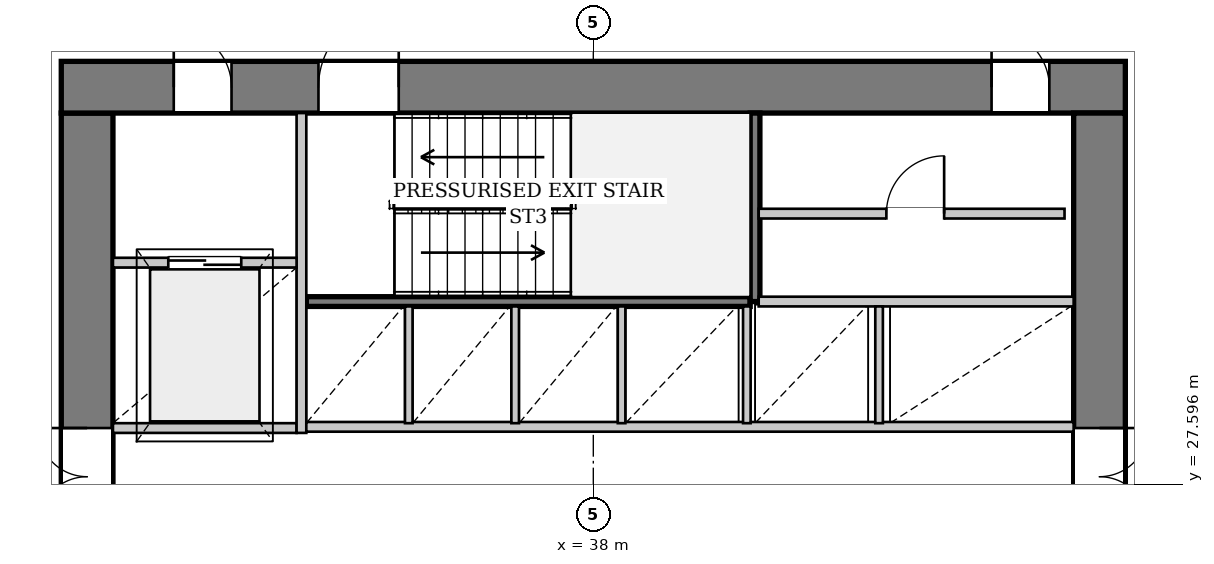
"""IFC4 building model, lengths in metres.
Left out: names, types, materials, properties, quantities, classifications, styles, units other than length and angle.
Written with IfcOpenShell. Run it as: python <this file> out.ifc"""

import sys

from ifc_helpers import new_model, si_unit, direction, frame, frame_2d, origin, place, context, subcontext, project, spatial, rectangle, extrude, source, transform, mapped, element, fill, save


model = new_model("IFC4")
c1 = context("Model", 3, precision=1e-05, world=origin(), true_north=direction((0.0, 1.0)))
c2 = subcontext(c1, "Body", "Model", "MODEL_VIEW")
j1 = project(units=[si_unit("LENGTHUNIT", "METRE"), si_unit("PLANEANGLEUNIT", "RADIAN")], contexts=[c1])
p1 = place(None, origin())
s1 = spatial("IfcSite", under=j1, at=p1, CompositionType="ELEMENT")
p2 = place(p1, origin())
s2 = spatial("IfcBuilding", under=s1, at=p2, CompositionType="ELEMENT")
p3 = place(p2, frame((0.0, 0.0, 57.7)))
s3 = spatial("IfcBuildingStorey", under=s2, at=p3, CompositionType="ELEMENT", Elevation=57.7)
p4 = place(p3, frame((29.675, 19.5, 0.0), z_axis=(0.0, 0.0, 1.0), x_axis=(0.0, 1.0, 0.0)))
e1 = element("IfcWall", 1, at=p4, inside=s3, PredefinedType="SHEAR", context=c2, shape_type="SweptSolid", body=[
    extrude(rectangle(XDim=14.2, YDim=0.85, at=frame_2d((7.1, 0.0))), origin(), (0.0, 0.0, 1.0), 3.3),
])
p5 = place(p4, frame((7.42, 0.0, 0.0)))
e2 = element("IfcOpeningElement", 2, at=p5, cuts=e1, PredefinedType="OPENING", context=c2, shape_type="SweptSolid", body=[
    extrude(rectangle(XDim=1.6, YDim=2.2, at=frame_2d((0.8, 1.1))), frame((0.0, 0.435, 0.0), z_axis=(0.0, -1.0, 0.0), x_axis=(1.0, 0.0, 0.0)), (0.0, 0.0, 1.0), 0.87),
])
p6 = place(p3, frame((29.25, 34.125, 0.0), z_axis=(0.0, 0.0, 1.0), x_axis=(1.0, 0.0, 0.0)))
e3 = element("IfcWall", 3, at=p6, inside=s3, PredefinedType="SHEAR", context=c2, shape_type="SweptSolid", body=[
    extrude(rectangle(XDim=17.5, YDim=0.85, at=frame_2d((8.75, 0.0))), origin(), (0.0, 0.0, 1.0), 3.3),
])
p7 = place(p6, frame((1.85, 0.0, 0.0)))
e4 = element("IfcOpeningElement", 4, at=p7, cuts=e3, PredefinedType="OPENING", context=c2, shape_type="SweptSolid", body=[
    extrude(rectangle(XDim=0.95, YDim=2.1, at=frame_2d((0.475, 1.05))), frame((0.0, 0.435, 0.0), z_axis=(0.0, -1.0, 0.0), x_axis=(1.0, 0.0, 0.0)), (0.0, 0.0, 1.0), 0.87),
])
p8 = place(p6, frame((4.23, 0.0, 0.0)))
e5 = element("IfcOpeningElement", 5, at=p8, cuts=e3, PredefinedType="OPENING", context=c2, shape_type="SweptSolid", body=[
    extrude(rectangle(XDim=1.32, YDim=2.2, at=frame_2d((0.66, 1.1))), frame((0.0, 0.435, 0.0), z_axis=(0.0, -1.0, 0.0), x_axis=(1.0, 0.0, 0.0)), (0.0, 0.0, 1.0), 0.87),
])
p9 = place(p6, frame((15.3, 0.0, 0.0)))
e6 = element("IfcOpeningElement", 6, at=p9, cuts=e3, PredefinedType="OPENING", context=c2, shape_type="SweptSolid", body=[
    extrude(rectangle(XDim=0.95, YDim=2.1, at=frame_2d((0.475, 1.05))), frame((0.0, 0.435, 0.0), z_axis=(0.0, -1.0, 0.0), x_axis=(1.0, 0.0, 0.0)), (0.0, 0.0, 1.0), 0.87),
])
p10 = place(p3, frame((46.325, 33.7, 0.0), z_axis=(0.0, 0.0, 1.0), x_axis=(0.0, -1.0, 0.0)))
e7 = element("IfcWall", 7, at=p10, inside=s3, PredefinedType="SHEAR", context=c2, shape_type="SweptSolid", body=[
    extrude(rectangle(XDim=14.2, YDim=0.85, at=frame_2d((7.1, 0.0))), origin(), (0.0, 0.0, 1.0), 3.3),
])
p11 = place(p10, frame((5.18, 0.0, 0.0)))
e8 = element("IfcOpeningElement", 8, at=p11, cuts=e7, PredefinedType="OPENING", context=c2, shape_type="SweptSolid", body=[
    extrude(rectangle(XDim=1.6, YDim=2.2, at=frame_2d((0.8, 1.1))), frame((0.0, 0.435, 0.0), z_axis=(0.0, -1.0, 0.0), x_axis=(1.0, 0.0, 0.0)), (0.0, 0.0, 1.0), 0.87),
])
p12 = place(p3, frame((33.28, 30.6, 0.0), z_axis=(0.0, 0.0, 1.0), x_axis=(1.0, 0.0, 0.0)))
e9 = element("IfcWall", 9, at=p12, inside=s3, PredefinedType="PARTITIONING", context=c2, shape_type="SweptSolid", body=[
    extrude(rectangle(XDim=7.3, YDim=0.16, at=frame_2d((3.65, 0.0))), origin(), (0.0, 0.0, 1.0), 3.3),
])
p13 = place(p3, frame((40.66, 30.6, 0.0), z_axis=(0.0, 0.0, 1.0), x_axis=(0.0, 1.0, 0.0)))
e10 = element("IfcWall", 10, at=p13, inside=s3, PredefinedType="PARTITIONING", context=c2, shape_type="SweptSolid", body=[
    extrude(rectangle(XDim=3.1, YDim=0.16, at=frame_2d((1.55, 0.0))), origin(), (0.0, 0.0, 1.0), 3.3),
])
p14 = place(p3, frame((30.1, 28.52, 0.0), z_axis=(0.0, 0.0, 1.0), x_axis=(1.0, 0.0, 0.0)))
e11 = element("IfcWall", 11, at=p14, inside=s3, PredefinedType="PARTITIONING", context=c2, shape_type="SweptSolid", body=[
    extrude(rectangle(XDim=3.02, YDim=0.16, at=frame_2d((1.51, 0.0))), origin(), (0.0, 0.0, 1.0), 3.3),
])
p15 = place(p3, frame((33.2, 28.44, 0.0), z_axis=(0.0, 0.0, 1.0), x_axis=(0.0, 1.0, 0.0)))
e12 = element("IfcWall", 12, at=p15, inside=s3, PredefinedType="PARTITIONING", context=c2, shape_type="SweptSolid", body=[
    extrude(rectangle(XDim=5.26, YDim=0.16, at=frame_2d((2.63, 0.0))), origin(), (0.0, 0.0, 1.0), 3.3),
])
p16 = place(p3, frame((30.1, 31.24, 0.0), z_axis=(0.0, 0.0, 1.0), x_axis=(1.0, 0.0, 0.0)))
e13 = element("IfcWall", 13, at=p16, inside=s3, PredefinedType="PARTITIONING", context=c2, shape_type="SweptSolid", body=[
    extrude(rectangle(XDim=3.02, YDim=0.16, at=frame_2d((1.51, 0.0))), origin(), (0.0, 0.0, 1.0), 3.3),
])
p17 = place(p16, frame((0.91, 0.0, 0.0)))
e14 = element("IfcOpeningElement", 14, at=p17, cuts=e13, PredefinedType="OPENING", context=c2, shape_type="SweptSolid", body=[
    extrude(rectangle(XDim=1.2, YDim=2.2, at=frame_2d((0.6, 1.1))), frame((0.0, 0.09, 0.0), z_axis=(0.0, -1.0, 0.0), x_axis=(1.0, 0.0, 0.0)), (0.0, 0.0, 1.0), 0.18),
])
p18 = place(p3, frame((33.28, 28.54, 0.0), z_axis=(0.0, 0.0, 1.0), x_axis=(1.0, 0.0, 0.0)))
e15 = element("IfcWall", 15, at=p18, inside=s3, PredefinedType="PARTITIONING", context=c2, shape_type="SweptSolid", body=[
    extrude(rectangle(XDim=12.62, YDim=0.16, at=frame_2d((6.31, 0.0))), origin(), (0.0, 0.0, 1.0), 3.3),
])
p19 = place(p3, frame((40.72, 30.6, 0.0), z_axis=(0.0, 0.0, 1.0), x_axis=(1.0, 0.0, 0.0)))
e16 = element("IfcWall", 16, at=p19, inside=s3, PredefinedType="PARTITIONING", context=c2, shape_type="SweptSolid", body=[
    extrude(rectangle(XDim=5.18, YDim=0.16, at=frame_2d((2.59, 0.0))), origin(), (0.0, 0.0, 1.0), 3.3),
])
for number, where, z_axis, x_axis in (
    (17, (34.965, 28.6, 0.0), (0.0, 0.0, 1.0), (0.0, 1.0, 0.0)),
    (18, (36.715, 28.6, 0.0), (0.0, 0.0, 1.0), (0.0, 1.0, 0.0)),
    (19, (38.465, 28.6, 0.0), (0.0, 0.0, 1.0), (0.0, 1.0, 0.0)),
    (20, (40.525, 28.6, 0.0), (0.0, 0.0, 1.0), (0.0, 1.0, 0.0)),
    (21, (42.7, 28.6, 0.0), (0.0, 0.0, 1.0), (0.0, 1.0, 0.0)),
):
    element("IfcWall", number, at=place(p3, frame(where, z_axis=z_axis, x_axis=x_axis)), inside=s3, PredefinedType="PARTITIONING", context=c2, shape_type="SweptSolid", body=[
        extrude(rectangle(XDim=1.92, YDim=0.125, at=frame_2d((0.96, 0.0))), origin(), (0.0, 0.0, 1.0), 3.3),
    ])
p20 = place(p3, frame((40.72, 32.046, 0.0), z_axis=(0.0, 0.0, 1.0), x_axis=(1.0, 0.0, 0.0)))
e22 = element("IfcWall", 22, at=p20, inside=s3, PredefinedType="PARTITIONING", context=c2, shape_type="SweptSolid", body=[
    extrude(rectangle(XDim=5.03, YDim=0.16, at=frame_2d((2.515, 0.0))), origin(), (0.0, 0.0, 1.0), 3.3),
])
p21 = place(p20, frame((2.1, 0.0, 0.0)))
e23 = element("IfcOpeningElement", 23, at=p21, cuts=e22, PredefinedType="OPENING", context=c2, shape_type="SweptSolid", body=[
    extrude(rectangle(XDim=0.95, YDim=2.1, at=frame_2d((0.475, 1.05))), frame((0.0, 0.09, 0.0), z_axis=(0.0, -1.0, 0.0), x_axis=(1.0, 0.0, 0.0)), (0.0, 0.0, 1.0), 0.18),
])
m1 = source(origin(), c2, "Body", "SweptSolid", [
    extrude(rectangle(XDim=1.6, YDim=2.2, at=frame_2d((0.8, 1.1))), frame((0.0, 0.025, 0.0), z_axis=(0.0, -1.0, 0.0), x_axis=(1.0, 0.0, 0.0)), (0.0, 0.0, 1.0), 0.05),
])
p22 = place(p5, origin())
e24 = element("IfcDoor", 24, at=p22, inside=s3, OperationType="DOUBLE_DOOR_SINGLE_SWING", PredefinedType="DOOR", context=c2, shape_type="MappedRepresentation", body=[
    mapped(m1, transform((0.0, 0.0, 0.0), x_axis=(1.0, 0.0, 0.0), y_axis=(0.0, 1.0, 0.0), z_axis=(0.0, 0.0, 1.0), scale=1.0)),
])
fill(e2, e24)
m2 = source(origin(), c2, "Body", "SweptSolid", [
    extrude(rectangle(XDim=0.95, YDim=2.1, at=frame_2d((0.475, 1.05))), frame((0.0, 0.025, 0.0), z_axis=(0.0, -1.0, 0.0), x_axis=(1.0, 0.0, 0.0)), (0.0, 0.0, 1.0), 0.05),
])
p23 = place(p7, origin())
e25 = element("IfcDoor", 25, at=p23, inside=s3, OperationType="SINGLE_SWING_LEFT", PredefinedType="DOOR", context=c2, shape_type="MappedRepresentation", body=[
    mapped(m2, transform((0.0, 0.0, 0.0), x_axis=(1.0, 0.0, 0.0), y_axis=(0.0, 1.0, 0.0), z_axis=(0.0, 0.0, 1.0), scale=1.0)),
])
fill(e4, e25)
m3 = source(origin(), c2, "Body", "SweptSolid", [
    extrude(rectangle(XDim=1.32, YDim=2.2, at=frame_2d((0.66, 1.1))), frame((0.0, 0.025, 0.0), z_axis=(0.0, -1.0, 0.0), x_axis=(1.0, 0.0, 0.0)), (0.0, 0.0, 1.0), 0.05),
])
p24 = place(p8, origin())
e26 = element("IfcDoor", 26, at=p24, inside=s3, OperationType="SINGLE_SWING_RIGHT", PredefinedType="DOOR", context=c2, shape_type="MappedRepresentation", body=[
    mapped(m3, transform((0.0, 0.0, 0.0), x_axis=(1.0, 0.0, 0.0), y_axis=(0.0, 1.0, 0.0), z_axis=(0.0, 0.0, 1.0), scale=1.0)),
])
fill(e5, e26)
p25 = place(p11, origin())
e27 = element("IfcDoor", 27, at=p25, inside=s3, OperationType="DOUBLE_DOOR_SINGLE_SWING", PredefinedType="DOOR", context=c2, shape_type="MappedRepresentation", body=[
    mapped(m1, transform((0.0, 0.0, 0.0), x_axis=(1.0, 0.0, 0.0), y_axis=(0.0, 1.0, 0.0), z_axis=(0.0, 0.0, 1.0), scale=1.0)),
])
fill(e8, e27)
m4 = source(origin(), c2, "Body", "SweptSolid", [
    extrude(rectangle(XDim=1.2, YDim=2.2, at=frame_2d((0.6, 1.1))), frame((0.0, 0.025, 0.0), z_axis=(0.0, -1.0, 0.0), x_axis=(1.0, 0.0, 0.0)), (0.0, 0.0, 1.0), 0.05),
])
p26 = place(p17, origin())
e28 = element("IfcDoor", 28, at=p26, inside=s3, OperationType="DOUBLE_DOOR_SLIDING", PredefinedType="DOOR", context=c2, shape_type="MappedRepresentation", body=[
    mapped(m4, transform((0.0, 0.0, 0.0), x_axis=(1.0, 0.0, 0.0), y_axis=(0.0, 1.0, 0.0), z_axis=(0.0, 0.0, 1.0), scale=1.0)),
])
fill(e14, e28)
p27 = place(p21, origin())
e29 = element("IfcDoor", 29, at=p27, inside=s3, OperationType="SINGLE_SWING_RIGHT", PredefinedType="DOOR", context=c2, shape_type="MappedRepresentation", body=[
    mapped(m2, transform((0.0, 0.0, 0.0), x_axis=(1.0, 0.0, 0.0), y_axis=(0.0, 1.0, 0.0), z_axis=(0.0, 0.0, 1.0), scale=1.0)),
])
fill(e23, e29)
p28 = place(p9, origin())
e30 = element("IfcDoor", 30, at=p28, inside=s3, OperationType="SINGLE_SWING_LEFT", PredefinedType="DOOR", context=c2, shape_type="MappedRepresentation", body=[
    mapped(m2, transform((0.0, 0.0, 0.0), x_axis=(1.0, 0.0, 0.0), y_axis=(0.0, 1.0, 0.0), z_axis=(0.0, 0.0, 1.0), scale=1.0)),
])
fill(e6, e30)
save(model, sys.argv[1])
